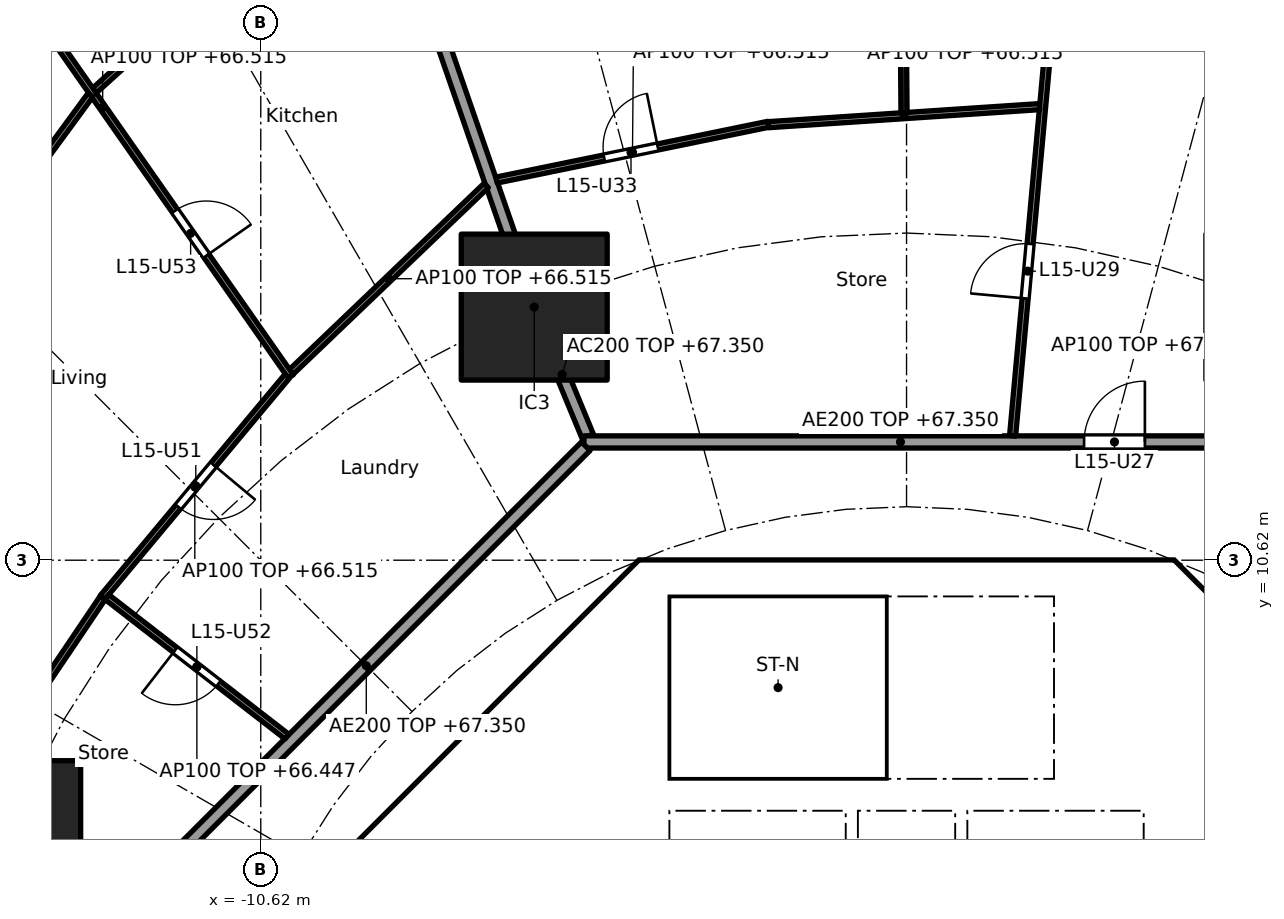
"""IFC4 building model, lengths in metres.
Left out: names, types, materials, properties, quantities, classifications, styles, units other than length and angle.
Written with IfcOpenShell. Run it as: python <this file> out.ifc"""

import sys

from ifc_helpers import new_model, si_unit, direction, frame, frame_2d, origin, origin_2d, place, context, subcontext, project, spatial, polyline, rectangle, outline, extrude, element, fill, save


model = new_model("IFC4")
c1 = context("Model", 3, precision=1e-05, world=origin(), true_north=direction((0.0, 1.0)))
c2 = subcontext(c1, "Body", "Model", "MODEL_VIEW")
j1 = project(units=[si_unit("LENGTHUNIT", "METRE"), si_unit("PLANEANGLEUNIT", "RADIAN")], contexts=[c1])
p1 = place(None, origin())
s1 = spatial("IfcSite", under=j1, at=p1, CompositionType="ELEMENT")
p2 = place(p1, origin())
s2 = spatial("IfcBuilding", under=s1, at=p2, CompositionType="ELEMENT")
p3 = place(p2, frame((0.0, 0.0, 64.0)))
s3 = spatial("IfcBuildingStorey", under=s2, at=p3, CompositionType="ELEMENT", Elevation=64.0)
for number, where, z_axis, x_axis in (
    (1, (-6.123, 14.782, 0.0), (0.0, 0.0, 1.0), (1.0, 0.0, 0.0)),
    (2, (-14.782, 6.123, 0.0), (0.0, 0.0, 1.0), (1.0, 0.0, 0.0)),
):
    element("IfcColumn", number, at=place(p3, frame(where, z_axis=z_axis, x_axis=x_axis)), inside=s3, PredefinedType="COLUMN", context=c2, shape_type="SweptSolid", body=[
        extrude(rectangle(XDim=2.4, YDim=2.4, at=origin_2d()), origin(), (0.0, 0.0, 1.0), 3.7),
    ])
p4 = place(p3, frame((9.988, 4.613, 0.0), z_axis=(0.0, 0.0, 1.0), x_axis=(-0.707106781187, 0.707106781187, 0.0)))
e3 = element("IfcWall", 3, at=p4, inside=s3, PredefinedType="SHEAR", context=c2, shape_type="SweptSolid", body=[
    extrude(rectangle(XDim=7.602, YDim=0.6, at=frame_2d((3.801, 0.0))), origin(), (0.0, 0.0, 1.0), 3.35),
])
p5 = place(p4, frame((3.201, 0.0, 0.0)))
e4 = element("IfcOpeningElement", 4, at=p5, cuts=e3, PredefinedType="OPENING", context=c2, shape_type="SweptSolid", body=[
    extrude(rectangle(XDim=1.2, YDim=2.1, at=frame_2d((0.6, 1.05))), frame((0.0, 0.31, 0.0), z_axis=(0.0, -1.0, 0.0), x_axis=(1.0, 0.0, 0.0)), (0.0, 0.0, 1.0), 0.62),
])
p6 = place(p3, frame((-4.613, 9.988, 0.0), z_axis=(0.0, 0.0, 1.0), x_axis=(-0.707106781187, -0.707106781187, 0.0)))
e5 = element("IfcWall", 5, at=p6, inside=s3, PredefinedType="SHEAR", context=c2, shape_type="SweptSolid", body=[
    extrude(rectangle(XDim=7.602, YDim=0.6, at=frame_2d((3.801, 0.0))), origin(), (0.0, 0.0, 1.0), 3.35),
])
p7 = place(p6, frame((0.351, 0.0, 0.0)))
e6 = element("IfcOpeningElement", 6, at=p7, cuts=e5, PredefinedType="OPENING", context=c2, shape_type="SweptSolid", body=[
    extrude(rectangle(XDim=1.1, YDim=2.1, at=frame_2d((0.55, 1.05))), frame((0.0, 0.31, 0.0), z_axis=(0.0, -1.0, 0.0), x_axis=(1.0, 0.0, 0.0)), (0.0, 0.0, 1.0), 0.62),
])
p8 = place(p3, frame((-5.8, 4.3, 0.0), z_axis=(0.0, 0.0, 1.0), x_axis=(0.0, 1.0, 0.0)))
e7 = element("IfcWall", 7, at=p8, inside=s3, PredefinedType="PARTITIONING", context=c2, shape_type="SweptSolid", body=[
    extrude(rectangle(XDim=3.927, YDim=0.15, at=frame_2d((1.963, 0.0))), origin(), (0.0, 0.0, 1.0), 3.35),
])
p9 = place(p8, frame((0.413, 0.0, 0.0)))
e8 = element("IfcOpeningElement", 8, at=p9, cuts=e7, PredefinedType="OPENING", context=c2, shape_type="SweptSolid", body=[
    extrude(rectangle(XDim=0.9, YDim=2.1, at=frame_2d((0.45, 1.05))), frame((0.0, 0.085, 0.0), z_axis=(0.0, -1.0, 0.0), x_axis=(1.0, 0.0, 0.0)), (0.0, 0.0, 1.0), 0.17),
])
p10 = place(p8, frame((2.489, 0.0, 0.0)))
e9 = element("IfcOpeningElement", 9, at=p10, cuts=e7, PredefinedType="OPENING", context=c2, shape_type="SweptSolid", body=[
    extrude(rectangle(XDim=0.9, YDim=2.1, at=frame_2d((0.45, 1.05))), frame((0.0, 0.085, 0.0), z_axis=(0.0, -1.0, 0.0), x_axis=(1.0, 0.0, 0.0)), (0.0, 0.0, 1.0), 0.17),
])
p11 = place(p3, frame((4.0, 4.3, 0.0), z_axis=(0.0, 0.0, 1.0), x_axis=(0.0, 1.0, 0.0)))
e10 = element("IfcWall", 10, at=p11, inside=s3, PredefinedType="SOLIDWALL", context=c2, shape_type="SweptSolid", body=[
    extrude(rectangle(XDim=2.2, YDim=0.2, at=frame_2d((1.1, 0.0))), origin(), (0.0, 0.0, 1.0), 3.35),
])
p12 = place(p11, frame((0.55, 0.0, 0.0)))
e11 = element("IfcOpeningElement", 11, at=p12, cuts=e10, PredefinedType="OPENING", context=c2, shape_type="SweptSolid", body=[
    extrude(rectangle(XDim=1.1, YDim=2.1, at=frame_2d((0.55, 1.05))), frame((0.0, 0.11, 0.0), z_axis=(0.0, -1.0, 0.0), x_axis=(1.0, 0.0, 0.0)), (0.0, 0.0, 1.0), 0.22),
])
p13 = place(p3, frame((-4.0, 4.3, 0.0), z_axis=(0.0, 0.0, 1.0), x_axis=(0.0, 1.0, 0.0)))
e12 = element("IfcWall", 12, at=p13, inside=s3, PredefinedType="SOLIDWALL", context=c2, shape_type="SweptSolid", body=[
    extrude(rectangle(XDim=2.2, YDim=0.2, at=frame_2d((1.1, 0.0))), origin(), (0.0, 0.0, 1.0), 3.35),
])
p14 = place(p13, frame((0.55, 0.0, 0.0)))
e13 = element("IfcOpeningElement", 13, at=p14, cuts=e12, PredefinedType="OPENING", context=c2, shape_type="SweptSolid", body=[
    extrude(rectangle(XDim=1.1, YDim=2.1, at=frame_2d((0.55, 1.05))), frame((0.0, 0.11, 0.0), z_axis=(0.0, -1.0, 0.0), x_axis=(1.0, 0.0, 0.0)), (0.0, 0.0, 1.0), 0.22),
])
p15 = place(p3, frame((4.0, 7.025, 0.0), z_axis=(0.0, 0.0, 1.0), x_axis=(0.0, 1.0, 0.0)))
e14 = element("IfcWall", 14, at=p15, inside=s3, PredefinedType="SOLIDWALL", context=c2, shape_type="SweptSolid", body=[
    extrude(rectangle(XDim=3.0, YDim=0.2, at=frame_2d((1.5, 0.0))), origin(), (0.0, 0.0, 1.0), 3.35),
])
p16 = place(p15, frame((0.925, 0.0, 0.0)))
e15 = element("IfcOpeningElement", 15, at=p16, cuts=e14, PredefinedType="OPENING", context=c2, shape_type="SweptSolid", body=[
    extrude(rectangle(XDim=1.1, YDim=2.1, at=frame_2d((0.55, 1.05))), frame((0.0, 0.11, 0.0), z_axis=(0.0, -1.0, 0.0), x_axis=(1.0, 0.0, 0.0)), (0.0, 0.0, 1.0), 0.22),
])
p17 = place(p3, origin())
e16 = element("IfcWall", 16, at=p17, inside=s3, PredefinedType="SHEAR", context=c2, shape_type="SweptSolid", body=[
    extrude(outline(polyline([(-4.152, 10.025), (-4.401, 9.776), (-4.825, 10.2), (-4.401, 10.625), (4.401, 10.625), (4.825, 10.2), (4.401, 9.776), (4.152, 10.025), (-4.152, 10.025)])), origin(), (0.0, 0.0, 1.0), 3.35),
])
p18 = place(p3, frame((-8.001, 6.1, 0.0), z_axis=(0.0, 0.0, 1.0), x_axis=(1.0, 0.0, 0.0)))
e17 = element("IfcWall", 17, at=p18, inside=s3, PredefinedType="PARTITIONING", context=c2, shape_type="SweptSolid", body=[
    extrude(rectangle(XDim=2.126, YDim=0.15, at=frame_2d((1.063, 0.0))), origin(), (0.0, 0.0, 1.0), 3.35),
])
for number, where, z_axis, x_axis in (
    (18, (-0.9, 4.3, 0.0), (0.0, 0.0, 1.0), (0.0, 1.0, 0.0)),
    (19, (0.9, 4.3, 0.0), (0.0, 0.0, 1.0), (0.0, 1.0, 0.0)),
):
    element("IfcWall", number, at=place(p3, frame(where, z_axis=z_axis, x_axis=x_axis)), inside=s3, PredefinedType="SOLIDWALL", context=c2, shape_type="SweptSolid", body=[
        extrude(rectangle(XDim=2.2, YDim=0.2, at=frame_2d((1.1, 0.0))), origin(), (0.0, 0.0, 1.0), 3.35),
    ])
p19 = place(p3, origin())
e20 = element("IfcWall", 20, at=p19, inside=s3, PredefinedType="SOLIDWALL", context=c2, shape_type="SweptSolid", body=[
    extrude(outline(polyline([(-3.9, 7.025), (-4.1, 7.025), (-4.1, 10.025), (-3.9, 10.025), (-3.9, 7.025)])), origin(), (0.0, 0.0, 1.0), 3.35),
])
p20 = place(p3, origin())
e21 = element("IfcWall", 21, at=p20, inside=s3, PredefinedType="SOLIDWALL", context=c2, shape_type="SweptSolid", body=[
    extrude(outline(polyline([(4.1, 6.5), (-4.1, 6.5), (-4.1, 7.025), (4.1, 7.025), (4.1, 6.5)])), origin(), (0.0, 0.0, 1.0), 3.35),
])
p21 = place(p3, frame((-5.243, 12.657, 0.0), z_axis=(0.0, 0.0, 1.0), x_axis=(-0.382668627144, 0.923885664896, 0.0)))
e22 = element("IfcWall", 22, at=p21, inside=s3, PredefinedType="PARTITIONING", context=c2, shape_type="SweptSolid", body=[
    extrude(rectangle(XDim=2.2, YDim=0.2, at=frame_2d((1.1, 0.0))), origin(), (0.0, 0.0, 1.0), 3.35),
])
p22 = place(p3, frame((-6.139, 14.829, 0.0), z_axis=(0.0, 0.0, 1.0), x_axis=(-0.327178799566, 0.944962450637, 0.0)))
e23 = element("IfcWall", 23, at=p22, inside=s3, PredefinedType="PARTITIONING", context=c2, shape_type="SweptSolid", body=[
    extrude(rectangle(XDim=13.517, YDim=0.2, at=frame_2d((6.759, 0.0))), origin(), (0.0, 0.0, 1.0), 2.515),
])
p23 = place(p3, frame((5.104, 12.565, 0.0), z_axis=(0.0, 0.0, 1.0), x_axis=(-1.0, 0.0, 0.0)))
e24 = element("IfcWall", 24, at=p23, inside=s3, PredefinedType="PARTITIONING", context=c2, shape_type="SweptSolid", body=[
    extrude(rectangle(XDim=10.409, YDim=0.2, at=frame_2d((5.205, 0.0))), origin(), (0.0, 0.0, 1.0), 3.35),
])
p24 = place(p23, frame((1.185, 0.0, 0.0)))
e25 = element("IfcOpeningElement", 25, at=p24, cuts=e24, PredefinedType="OPENING", context=c2, shape_type="SweptSolid", body=[
    extrude(rectangle(XDim=1.0, YDim=2.1, at=frame_2d((0.5, 1.05))), frame((0.0, 0.11, 0.0), z_axis=(0.0, -1.0, 0.0), x_axis=(1.0, 0.0, 0.0)), (0.0, 0.0, 1.0), 0.22),
])
p25 = place(p3, frame((-5.275, 12.494, 0.0), z_axis=(0.0, 0.0, 1.0), x_axis=(-0.707106781187, -0.707106781187, 0.0)))
e26 = element("IfcWall", 26, at=p25, inside=s3, PredefinedType="PARTITIONING", context=c2, shape_type="SweptSolid", body=[
    extrude(rectangle(XDim=10.209, YDim=0.2, at=frame_2d((5.104, 0.0))), origin(), (0.0, 0.0, 1.0), 3.35),
])
p26 = place(p3, frame((1.744, 12.664, 0.0), z_axis=(0.0, 0.0, 1.0), x_axis=(0.090893639596, 0.995860605849, 0.0)))
e27 = element("IfcWall", 27, at=p26, inside=s3, PredefinedType="PARTITIONING", context=c2, shape_type="SweptSolid", body=[
    extrude(rectangle(XDim=19.374, YDim=0.1, at=frame_2d((9.687, 0.0))), origin(), (0.0, 0.0, 1.0), 2.447),
])
p27 = place(p26, frame((2.27, 0.0, 0.0)))
e28 = element("IfcOpeningElement", 28, at=p27, cuts=e27, PredefinedType="OPENING", context=c2, shape_type="SweptSolid", body=[
    extrude(rectangle(XDim=0.9, YDim=2.1, at=frame_2d((0.45, 1.05))), frame((0.0, 0.06, 0.0), z_axis=(0.0, -1.0, 0.0), x_axis=(1.0, 0.0, 0.0)), (0.0, 0.0, 1.0), 0.12),
])
p28 = place(p26, frame((8.582, 0.0, 0.0)))
e29 = element("IfcOpeningElement", 29, at=p28, cuts=e27, PredefinedType="OPENING", context=c2, shape_type="SweptSolid", body=[
    extrude(rectangle(XDim=0.9, YDim=2.1, at=frame_2d((0.45, 1.05))), frame((0.0, 0.06, 0.0), z_axis=(0.0, -1.0, 0.0), x_axis=(1.0, 0.0, 0.0)), (0.0, 0.0, 1.0), 0.12),
])
p29 = place(p26, frame((15.548, 0.0, 0.0)))
e30 = element("IfcOpeningElement", 30, at=p29, cuts=e27, PredefinedType="OPENING", context=c2, shape_type="SweptSolid", body=[
    extrude(rectangle(XDim=0.9, YDim=2.1, at=frame_2d((0.45, 1.05))), frame((0.0, 0.06, 0.0), z_axis=(0.0, -1.0, 0.0), x_axis=(1.0, 0.0, 0.0)), (0.0, 0.0, 1.0), 0.12),
])
p30 = place(p3, frame((2.188, 18.079, 0.0), z_axis=(0.0, 0.0, 1.0), x_axis=(-0.997791437766, -0.066424744789, 0.0)))
e31 = element("IfcWall", 31, at=p30, inside=s3, PredefinedType="PARTITIONING", context=c2, shape_type="SweptSolid", body=[
    extrude(rectangle(XDim=4.469, YDim=0.1, at=frame_2d((2.235, 0.0))), origin(), (0.0, 0.0, 1.0), 2.515),
])
p31 = place(p3, frame((-0.042, 17.98, 0.0), z_axis=(0.0, 0.0, 1.0), x_axis=(-0.007692080119, 0.999970415514, 0.0)))
e32 = element("IfcWall", 32, at=p31, inside=s3, PredefinedType="PARTITIONING", context=c2, shape_type="SweptSolid", body=[
    extrude(rectangle(XDim=6.856, YDim=0.1, at=frame_2d((3.428, 0.0))), origin(), (0.0, 0.0, 1.0), 3.35),
])
p32 = place(p3, frame((-2.272, 17.789, 0.0), z_axis=(0.0, 0.0, 1.0), x_axis=(-0.979595137747, -0.200981009307, 0.0)))
e33 = element("IfcWall", 33, at=p32, inside=s3, PredefinedType="PARTITIONING", context=c2, shape_type="SweptSolid", body=[
    extrude(rectangle(XDim=4.562, YDim=0.1, at=frame_2d((2.281, 0.0))), origin(), (0.0, 0.0, 1.0), 2.515),
])
p33 = place(p32, frame((1.856, 0.0, 0.0)))
e34 = element("IfcOpeningElement", 34, at=p33, cuts=e33, PredefinedType="OPENING", context=c2, shape_type="SweptSolid", body=[
    extrude(rectangle(XDim=0.9, YDim=2.1, at=frame_2d((0.45, 1.05))), frame((0.0, 0.06, 0.0), z_axis=(0.0, -1.0, 0.0), x_axis=(1.0, 0.0, 0.0)), (0.0, 0.0, 1.0), 0.12),
])
p34 = place(p3, frame((-6.912, 16.782, 0.0), z_axis=(0.0, 0.0, 1.0), x_axis=(-0.722775679202, -0.691082713975, 0.0)))
e35 = element("IfcWall", 35, at=p34, inside=s3, PredefinedType="PARTITIONING", context=c2, shape_type="SweptSolid", body=[
    extrude(rectangle(XDim=4.437, YDim=0.1, at=frame_2d((2.219, 0.0))), origin(), (0.0, 0.0, 1.0), 2.515),
])
p35 = place(p3, frame((-8.861, 22.407, 0.0), z_axis=(0.0, 0.0, 1.0), x_axis=(-0.741713303551, -0.670717060567, 0.0)))
e36 = element("IfcWall", 36, at=p35, inside=s3, PredefinedType="PARTITIONING", context=c2, shape_type="SweptSolid", body=[
    extrude(rectangle(XDim=6.059, YDim=0.1, at=frame_2d((3.03, 0.0))), origin(), (0.0, 0.0, 1.0), 2.515),
])
p36 = place(p35, frame((2.58, 0.0, 0.0)))
e37 = element("IfcOpeningElement", 37, at=p36, cuts=e36, PredefinedType="OPENING", context=c2, shape_type="SweptSolid", body=[
    extrude(rectangle(XDim=0.9, YDim=2.1, at=frame_2d((0.45, 1.05))), frame((0.0, 0.06, 0.0), z_axis=(0.0, -1.0, 0.0), x_axis=(1.0, 0.0, 0.0)), (0.0, 0.0, 1.0), 0.12),
])
p37 = place(p3, frame((-10.126, 13.641, 0.0), z_axis=(0.0, 0.0, 1.0), x_axis=(-0.57313289907, 0.819462433552, 0.0)))
e38 = element("IfcWall", 38, at=p37, inside=s3, PredefinedType="PARTITIONING", context=c2, shape_type="SweptSolid", body=[
    extrude(rectangle(XDim=10.794, YDim=0.1, at=frame_2d((5.397, 0.0))), origin(), (0.0, 0.0, 1.0), 2.515),
])
p38 = place(p37, frame((2.424, 0.0, 0.0)))
e39 = element("IfcOpeningElement", 39, at=p38, cuts=e38, PredefinedType="OPENING", context=c2, shape_type="SweptSolid", body=[
    extrude(rectangle(XDim=0.9, YDim=2.1, at=frame_2d((0.45, 1.05))), frame((0.0, 0.06, 0.0), z_axis=(0.0, -1.0, 0.0), x_axis=(1.0, 0.0, 0.0)), (0.0, 0.0, 1.0), 0.12),
])
p39 = place(p3, frame((-10.187, 13.643, 0.0), z_axis=(0.0, 0.0, 1.0), x_axis=(-0.640807748916, -0.767701393075, 0.0)))
e40 = element("IfcWall", 40, at=p39, inside=s3, PredefinedType="PARTITIONING", context=c2, shape_type="SweptSolid", body=[
    extrude(rectangle(XDim=4.737, YDim=0.1, at=frame_2d((2.368, 0.0))), origin(), (0.0, 0.0, 1.0), 2.515),
])
p40 = place(p39, frame((1.893, 0.0, 0.0)))
e41 = element("IfcOpeningElement", 41, at=p40, cuts=e40, PredefinedType="OPENING", context=c2, shape_type="SweptSolid", body=[
    extrude(rectangle(XDim=0.9, YDim=2.1, at=frame_2d((0.45, 1.05))), frame((0.0, 0.06, 0.0), z_axis=(0.0, -1.0, 0.0), x_axis=(1.0, 0.0, 0.0)), (0.0, 0.0, 1.0), 0.12),
])
p41 = place(p3, frame((-13.421, 18.269, 0.0), z_axis=(0.0, 0.0, 1.0), x_axis=(-0.591206785834, -0.806520016109, 0.0)))
e42 = element("IfcWall", 42, at=p41, inside=s3, PredefinedType="PARTITIONING", context=c2, shape_type="SweptSolid", body=[
    extrude(rectangle(XDim=6.41, YDim=0.1, at=frame_2d((3.205, 0.0))), origin(), (0.0, 0.0, 1.0), 2.515),
])
p42 = place(p41, frame((2.73, 0.0, 0.0)))
e43 = element("IfcOpeningElement", 43, at=p42, cuts=e42, PredefinedType="OPENING", context=c2, shape_type="SweptSolid", body=[
    extrude(rectangle(XDim=0.9, YDim=2.1, at=frame_2d((0.45, 1.05))), frame((0.0, 0.06, 0.0), z_axis=(0.0, -1.0, 0.0), x_axis=(1.0, 0.0, 0.0)), (0.0, 0.0, 1.0), 0.12),
])
p43 = place(p3, frame((-10.19, 7.719, 0.0), z_axis=(0.0, 0.0, 1.0), x_axis=(-0.790253294643, 0.612780327937, 0.0)))
e44 = element("IfcWall", 44, at=p43, inside=s3, PredefinedType="PARTITIONING", context=c2, shape_type="SweptSolid", body=[
    extrude(rectangle(XDim=3.746, YDim=0.1, at=frame_2d((1.873, 0.0))), origin(), (0.0, 0.0, 1.0), 2.447),
])
p44 = place(p43, frame((1.423, 0.0, 0.0)))
e45 = element("IfcOpeningElement", 45, at=p44, cuts=e44, PredefinedType="OPENING", context=c2, shape_type="SweptSolid", body=[
    extrude(rectangle(XDim=0.9, YDim=2.1, at=frame_2d((0.45, 1.05))), frame((0.0, 0.06, 0.0), z_axis=(0.0, -1.0, 0.0), x_axis=(1.0, 0.0, 0.0)), (0.0, 0.0, 1.0), 0.12),
])
p45 = place(p3, frame((-13.218, 10.004, 0.0), z_axis=(0.0, 0.0, 1.0), x_axis=(-0.559126445155, -0.82908239538, 0.0)))
e46 = element("IfcWall", 46, at=p45, inside=s3, PredefinedType="PARTITIONING", context=c2, shape_type="SweptSolid", body=[
    extrude(rectangle(XDim=4.358, YDim=0.1, at=frame_2d((2.179, 0.0))), origin(), (0.0, 0.0, 1.0), 3.35),
])
p46 = place(p3, frame((-12.657, 5.243, 0.0), z_axis=(0.0, 0.0, 1.0), x_axis=(-0.923864733477, 0.382719158442, 0.0)))
e47 = element("IfcWall", 47, at=p46, inside=s3, PredefinedType="PARTITIONING", context=c2, shape_type="SweptSolid", body=[
    extrude(rectangle(XDim=2.25, YDim=0.1, at=frame_2d((1.125, 0.0))), origin(), (0.0, 0.0, 1.0), 3.35),
])
p47 = place(p16, origin())
e48 = element("IfcDoor", 48, at=p47, inside=s3, OperationType="SINGLE_SWING_RIGHT", PredefinedType="DOOR", context=c2, shape_type="SweptSolid", body=[
    extrude(rectangle(XDim=1.1, YDim=2.1, at=frame_2d((0.55, 1.05))), frame((0.0, 0.025, 0.0), z_axis=(0.0, -1.0, 0.0), x_axis=(1.0, 0.0, 0.0)), (0.0, 0.0, 1.0), 0.05),
])
fill(e15, e48)
p48 = place(p10, origin())
e49 = element("IfcDoor", 49, at=p48, inside=s3, OperationType="SINGLE_SWING_LEFT", PredefinedType="DOOR", context=c2, shape_type="SweptSolid", body=[
    extrude(rectangle(XDim=0.9, YDim=2.1, at=frame_2d((0.45, 1.05))), frame((0.0, 0.025, 0.0), z_axis=(0.0, -1.0, 0.0), x_axis=(1.0, 0.0, 0.0)), (0.0, 0.0, 1.0), 0.05),
])
fill(e9, e49)
p49 = place(p7, origin())
e50 = element("IfcDoor", 50, at=p49, inside=s3, OperationType="SINGLE_SWING_RIGHT", PredefinedType="DOOR", context=c2, shape_type="SweptSolid", body=[
    extrude(rectangle(XDim=1.1, YDim=2.1, at=frame_2d((0.55, 1.05))), frame((0.0, 0.025, 0.0), z_axis=(0.0, -1.0, 0.0), x_axis=(1.0, 0.0, 0.0)), (0.0, 0.0, 1.0), 0.05),
])
fill(e6, e50)
p50 = place(p24, frame((1.0, 0.0, 0.0), x_axis=(-1.0, 0.0, 0.0)))
e51 = element("IfcDoor", 51, at=p50, inside=s3, OperationType="SINGLE_SWING_RIGHT", PredefinedType="DOOR", context=c2, shape_type="SweptSolid", body=[
    extrude(rectangle(XDim=1.0, YDim=2.1, at=frame_2d((0.5, 1.05))), frame((0.0, 0.025, 0.0), z_axis=(0.0, -1.0, 0.0), x_axis=(1.0, 0.0, 0.0)), (0.0, 0.0, 1.0), 0.05),
])
fill(e25, e51)
p51 = place(p27, origin())
e52 = element("IfcDoor", 52, at=p51, inside=s3, OperationType="SINGLE_SWING_LEFT", PredefinedType="DOOR", context=c2, shape_type="SweptSolid", body=[
    extrude(rectangle(XDim=0.9, YDim=2.1, at=frame_2d((0.45, 1.05))), frame((0.0, 0.025, 0.0), z_axis=(0.0, -1.0, 0.0), x_axis=(1.0, 0.0, 0.0)), (0.0, 0.0, 1.0), 0.05),
])
fill(e28, e52)
p52 = place(p33, frame((0.9, 0.0, 0.0), x_axis=(-1.0, 0.0, 0.0)))
e53 = element("IfcDoor", 53, at=p52, inside=s3, OperationType="SINGLE_SWING_RIGHT", PredefinedType="DOOR", context=c2, shape_type="SweptSolid", body=[
    extrude(rectangle(XDim=0.9, YDim=2.1, at=frame_2d((0.45, 1.05))), frame((0.0, 0.025, 0.0), z_axis=(0.0, -1.0, 0.0), x_axis=(1.0, 0.0, 0.0)), (0.0, 0.0, 1.0), 0.05),
])
fill(e34, e53)
p53 = place(p40, origin())
e54 = element("IfcDoor", 54, at=p53, inside=s3, OperationType="SINGLE_SWING_LEFT", PredefinedType="DOOR", context=c2, shape_type="SweptSolid", body=[
    extrude(rectangle(XDim=0.9, YDim=2.1, at=frame_2d((0.45, 1.05))), frame((0.0, 0.025, 0.0), z_axis=(0.0, -1.0, 0.0), x_axis=(1.0, 0.0, 0.0)), (0.0, 0.0, 1.0), 0.05),
])
fill(e41, e54)
p54 = place(p44, origin())
e55 = element("IfcDoor", 55, at=p54, inside=s3, OperationType="SINGLE_SWING_RIGHT", PredefinedType="DOOR", context=c2, shape_type="SweptSolid", body=[
    extrude(rectangle(XDim=0.9, YDim=2.1, at=frame_2d((0.45, 1.05))), frame((0.0, 0.025, 0.0), z_axis=(0.0, -1.0, 0.0), x_axis=(1.0, 0.0, 0.0)), (0.0, 0.0, 1.0), 0.05),
])
fill(e45, e55)
p55 = place(p38, frame((0.9, 0.0, 0.0), x_axis=(-1.0, 0.0, 0.0)))
e56 = element("IfcDoor", 56, at=p55, inside=s3, OperationType="SINGLE_SWING_RIGHT", PredefinedType="DOOR", context=c2, shape_type="SweptSolid", body=[
    extrude(rectangle(XDim=0.9, YDim=2.1, at=frame_2d((0.45, 1.05))), frame((0.0, 0.025, 0.0), z_axis=(0.0, -1.0, 0.0), x_axis=(1.0, 0.0, 0.0)), (0.0, 0.0, 1.0), 0.05),
])
fill(e39, e56)
save(model, sys.argv[1])
